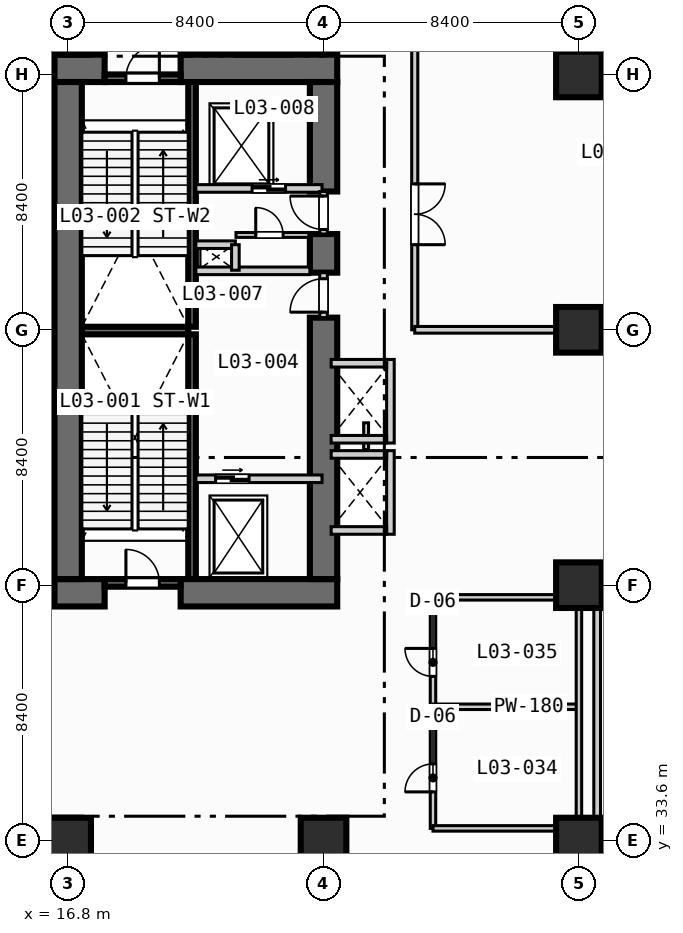
"""IFC4 building model, lengths in metres.
Left out: names, types, materials, properties, quantities, classifications, styles, units other than length and angle.
Written with IfcOpenShell. Run it as: python <this file> out.ifc"""

import sys

from ifc_helpers import new_model, si_unit, direction, frame, frame_2d, origin, origin_2d, place, context, subcontext, project, spatial, rectangle, extrude, element, fill, save


model = new_model("IFC4")
c1 = context("Model", 3, precision=1e-05, world=origin(), true_north=direction((0.0, 1.0)))
c2 = subcontext(c1, "Body", "Model", "MODEL_VIEW")
j1 = project(units=[si_unit("LENGTHUNIT", "METRE"), si_unit("PLANEANGLEUNIT", "RADIAN")], contexts=[c1])
p1 = place(None, origin())
s1 = spatial("IfcSite", under=j1, at=p1, CompositionType="ELEMENT")
p2 = place(p1, origin())
s2 = spatial("IfcBuilding", under=s1, at=p2, CompositionType="ELEMENT")
p3 = place(p2, frame((0.0, 0.0, 15.6)))
s3 = spatial("IfcBuildingStorey", under=s2, at=p3, CompositionType="ELEMENT", Elevation=15.6)
for number, where, z_axis, x_axis in (
    (1, (20.875, 42.2, 0.0), (0.0, 0.0, 1.0), (0.0, 1.0, 0.0)),
    (2, (20.875, 50.5, 0.0), (0.0, 0.0, 1.0), (0.0, 1.0, 0.0)),
):
    element("IfcWall", number, at=place(p3, frame(where, z_axis=z_axis, x_axis=x_axis)), inside=s3, PredefinedType="SOLIDWALL", context=c2, shape_type="SweptSolid", body=[
        extrude(rectangle(XDim=8.05, YDim=0.25, at=frame_2d((4.025, 0.0))), origin(), (0.0, 0.0, 1.0), 4.85),
    ])
p4 = place(p3, frame((17.25, 50.375, 0.0), z_axis=(0.0, 0.0, 1.0), x_axis=(1.0, 0.0, 0.0)))
e3 = element("IfcWall", 3, at=p4, inside=s3, PredefinedType="SOLIDWALL", context=c2, shape_type="SweptSolid", body=[
    extrude(rectangle(XDim=3.5, YDim=0.25, at=frame_2d((1.75, 0.0))), origin(), (0.0, 0.0, 1.0), 4.85),
])
p5 = place(p3, frame((16.35, 41.75, 0.0), z_axis=(0.0, 0.0, 1.0), x_axis=(1.0, 0.0, 0.0)))
e4 = element("IfcWall", 4, at=p5, inside=s3, PredefinedType="SHEAR", context=c2, shape_type="SweptSolid", body=[
    extrude(rectangle(XDim=1.65, YDim=0.9, at=frame_2d((0.825, 0.0))), origin(), (0.0, 0.0, 1.0), 4.85),
])
p6 = place(p3, frame((20.5, 41.75, 0.0), z_axis=(0.0, 0.0, 1.0), x_axis=(1.0, 0.0, 0.0)))
e5 = element("IfcWall", 5, at=p6, inside=s3, PredefinedType="SHEAR", context=c2, shape_type="SweptSolid", body=[
    extrude(rectangle(XDim=5.15, YDim=0.9, at=frame_2d((2.575, 0.0))), origin(), (0.0, 0.0, 1.0), 4.85),
])
p7 = place(p3, frame((16.35, 59.0, 0.0), z_axis=(0.0, 0.0, 1.0), x_axis=(1.0, 0.0, 0.0)))
e6 = element("IfcWall", 6, at=p7, inside=s3, PredefinedType="SHEAR", context=c2, shape_type="SweptSolid", body=[
    extrude(rectangle(XDim=1.65, YDim=0.9, at=frame_2d((0.825, 0.0))), origin(), (0.0, 0.0, 1.0), 4.85),
])
p8 = place(p3, frame((20.5, 59.0, 0.0), z_axis=(0.0, 0.0, 1.0), x_axis=(1.0, 0.0, 0.0)))
e7 = element("IfcWall", 7, at=p8, inside=s3, PredefinedType="SHEAR", context=c2, shape_type="SweptSolid", body=[
    extrude(rectangle(XDim=5.15, YDim=0.9, at=frame_2d((2.575, 0.0))), origin(), (0.0, 0.0, 1.0), 4.85),
])
p9 = place(p3, frame((16.8, 42.2, 0.0), z_axis=(0.0, 0.0, 1.0), x_axis=(0.0, 1.0, 0.0)))
e8 = element("IfcWall", 8, at=p9, inside=s3, PredefinedType="SHEAR", context=c2, shape_type="SweptSolid", body=[
    extrude(rectangle(XDim=16.35, YDim=0.9, at=frame_2d((8.175, 0.0))), origin(), (0.0, 0.0, 1.0), 4.85),
])
p10 = place(p3, frame((25.2, 42.2, 0.0), z_axis=(0.0, 0.0, 1.0), x_axis=(0.0, 1.0, 0.0)))
e9 = element("IfcWall", 9, at=p10, inside=s3, PredefinedType="SHEAR", context=c2, shape_type="SweptSolid", body=[
    extrude(rectangle(XDim=8.6, YDim=0.9, at=frame_2d((4.3, 0.0))), origin(), (0.0, 0.0, 1.0), 4.85),
])
p11 = place(p3, frame((25.2, 52.28, 0.0), z_axis=(0.0, 0.0, 1.0), x_axis=(0.0, 1.0, 0.0)))
e10 = element("IfcWall", 10, at=p11, inside=s3, PredefinedType="SHEAR", context=c2, shape_type="SweptSolid", body=[
    extrude(rectangle(XDim=1.27, YDim=0.9, at=frame_2d((0.635, 0.0))), origin(), (0.0, 0.0, 1.0), 4.85),
])
p12 = place(p3, frame((25.2, 54.95, 0.0), z_axis=(0.0, 0.0, 1.0), x_axis=(0.0, 1.0, 0.0)))
e11 = element("IfcWall", 11, at=p12, inside=s3, PredefinedType="SHEAR", context=c2, shape_type="SweptSolid", body=[
    extrude(rectangle(XDim=3.6, YDim=0.9, at=frame_2d((1.8, 0.0))), origin(), (0.0, 0.0, 1.0), 4.85),
])
for number, where, z_axis, x_axis in (
    (12, (16.8, 33.6, 0.0), (0.0, 0.0, 1.0), (1.0, 0.0, 0.0)),
    (13, (25.2, 33.6, 0.0), (0.0, 0.0, 1.0), (1.0, 0.0, 0.0)),
    (14, (33.6, 33.6, 0.0), (0.0, 0.0, 1.0), (1.0, 0.0, 0.0)),
    (15, (33.6, 42.0, 0.0), (0.0, 0.0, 1.0), (1.0, 0.0, 0.0)),
    (16, (33.6, 50.4, 0.0), (0.0, 0.0, 1.0), (1.0, 0.0, 0.0)),
    (17, (33.6, 58.8, 0.0), (0.0, 0.0, 1.0), (1.0, 0.0, 0.0)),
):
    element("IfcColumn", number, at=place(p3, frame(where, z_axis=z_axis, x_axis=x_axis)), inside=s3, PredefinedType="COLUMN", context=c2, shape_type="SweptSolid", body=[
        extrude(rectangle(XDim=1.5, YDim=1.5, at=origin_2d()), origin(), (0.0, 0.0, 1.0), 5.2),
    ])
p13 = place(p3, frame((18.0, 42.075, 0.0), z_axis=(0.0, 0.0, 1.0), x_axis=(1.0, 0.0, 0.0)))
e18 = element("IfcWall", 18, at=p13, inside=s3, PredefinedType="SOLIDWALL", context=c2, shape_type="SweptSolid", body=[
    extrude(rectangle(XDim=2.5, YDim=0.25, at=frame_2d((1.25, 0.0))), origin(), (0.0, 0.0, 1.0), 4.85),
])
p14 = place(p13, frame((0.7, 0.0, 0.0)))
e19 = element("IfcOpeningElement", 19, at=p14, cuts=e18, PredefinedType="OPENING", context=c2, shape_type="SweptSolid", body=[
    extrude(rectangle(XDim=1.1, YDim=2.15, at=frame_2d((0.55, 1.075))), frame((0.0, 0.135, 0.0), z_axis=(0.0, -1.0, 0.0), x_axis=(1.0, 0.0, 0.0)), (0.0, 0.0, 1.0), 0.27),
])
p15 = place(p3, frame((18.0, 58.675, 0.0), z_axis=(0.0, 0.0, 1.0), x_axis=(1.0, 0.0, 0.0)))
e20 = element("IfcWall", 20, at=p15, inside=s3, PredefinedType="SOLIDWALL", context=c2, shape_type="SweptSolid", body=[
    extrude(rectangle(XDim=2.5, YDim=0.25, at=frame_2d((1.25, 0.0))), origin(), (0.0, 0.0, 1.0), 4.85),
])
p16 = place(p15, frame((0.7, 0.0, 0.0)))
e21 = element("IfcOpeningElement", 21, at=p16, cuts=e20, PredefinedType="OPENING", context=c2, shape_type="SweptSolid", body=[
    extrude(rectangle(XDim=1.1, YDim=2.15, at=frame_2d((0.55, 1.075))), frame((0.0, 0.135, 0.0), z_axis=(0.0, -1.0, 0.0), x_axis=(1.0, 0.0, 0.0)), (0.0, 0.0, 1.0), 0.27),
])
p17 = place(p3, frame((21.0, 45.5, 0.0), z_axis=(0.0, 0.0, 1.0), x_axis=(1.0, 0.0, 0.0)))
e22 = element("IfcWall", 22, at=p17, inside=s3, PredefinedType="SOLIDWALL", context=c2, shape_type="SweptSolid", body=[
    extrude(rectangle(XDim=4.15, YDim=0.25, at=frame_2d((2.075, 0.0))), origin(), (0.0, 0.0, 1.0), 4.85),
])
p18 = place(p17, frame((0.65, 0.0, 0.0)))
e23 = element("IfcOpeningElement", 23, at=p18, cuts=e22, PredefinedType="OPENING", context=c2, shape_type="SweptSolid", body=[
    extrude(rectangle(XDim=1.1, YDim=2.15, at=frame_2d((0.55, 1.075))), frame((0.0, 0.135, 0.0), z_axis=(0.0, -1.0, 0.0), x_axis=(1.0, 0.0, 0.0)), (0.0, 0.0, 1.0), 0.27),
])
p19 = place(p3, frame((25.2, 50.8, 0.0), z_axis=(0.0, 0.0, 1.0), x_axis=(0.0, 1.0, 0.0)))
e24 = element("IfcWall", 24, at=p19, inside=s3, PredefinedType="SOLIDWALL", context=c2, shape_type="SweptSolid", body=[
    extrude(rectangle(XDim=1.48, YDim=0.25, at=frame_2d((0.74, 0.0))), origin(), (0.0, 0.0, 1.0), 4.85),
])
p20 = place(p19, frame((0.18, 0.0, 0.0)))
e25 = element("IfcOpeningElement", 25, at=p20, cuts=e24, PredefinedType="OPENING", context=c2, shape_type="SweptSolid", body=[
    extrude(rectangle(XDim=1.1, YDim=2.15, at=frame_2d((0.55, 1.075))), frame((0.0, 0.135, 0.0), z_axis=(0.0, -1.0, 0.0), x_axis=(1.0, 0.0, 0.0)), (0.0, 0.0, 1.0), 0.27),
])
p21 = place(p3, frame((21.0, 52.34, 0.0), z_axis=(0.0, 0.0, 1.0), x_axis=(1.0, 0.0, 0.0)))
e26 = element("IfcWall", 26, at=p21, inside=s3, PredefinedType="SOLIDWALL", context=c2, shape_type="SweptSolid", body=[
    extrude(rectangle(XDim=3.75, YDim=0.25, at=frame_2d((1.875, 0.0))), origin(), (0.0, 0.0, 1.0), 4.85),
])
p22 = place(p3, frame((21.0, 55.05, 0.0), z_axis=(0.0, 0.0, 1.0), x_axis=(1.0, 0.0, 0.0)))
e27 = element("IfcWall", 27, at=p22, inside=s3, PredefinedType="SOLIDWALL", context=c2, shape_type="SweptSolid", body=[
    extrude(rectangle(XDim=4.15, YDim=0.25, at=frame_2d((2.075, 0.0))), origin(), (0.0, 0.0, 1.0), 4.85),
])
p23 = place(p22, frame((1.85, 0.0, 0.0)))
e28 = element("IfcOpeningElement", 28, at=p23, cuts=e27, PredefinedType="OPENING", context=c2, shape_type="SweptSolid", body=[
    extrude(rectangle(XDim=1.1, YDim=2.15, at=frame_2d((0.55, 1.075))), frame((0.0, 0.135, 0.0), z_axis=(0.0, -1.0, 0.0), x_axis=(1.0, 0.0, 0.0)), (0.0, 0.0, 1.0), 0.27),
])
p24 = place(p3, frame((25.2, 53.55, 0.0), z_axis=(0.0, 0.0, 1.0), x_axis=(0.0, 1.0, 0.0)))
e29 = element("IfcWall", 29, at=p24, inside=s3, PredefinedType="SOLIDWALL", context=c2, shape_type="SweptSolid", body=[
    extrude(rectangle(XDim=1.4, YDim=0.25, at=frame_2d((0.7, 0.0))), origin(), (0.0, 0.0, 1.0), 4.85),
])
p25 = place(p24, frame((0.15, 0.0, 0.0)))
e30 = element("IfcOpeningElement", 30, at=p25, cuts=e29, PredefinedType="OPENING", context=c2, shape_type="SweptSolid", body=[
    extrude(rectangle(XDim=1.1, YDim=2.15, at=frame_2d((0.55, 1.075))), frame((0.0, 0.135, 0.0), z_axis=(0.0, -1.0, 0.0), x_axis=(1.0, 0.0, 0.0)), (0.0, 0.0, 1.0), 0.27),
])
p26 = place(p3, frame((21.0, 53.2, 0.0), z_axis=(0.0, 0.0, 1.0), x_axis=(1.0, 0.0, 0.0)))
e31 = element("IfcWall", 31, at=p26, inside=s3, PredefinedType="SOLIDWALL", context=c2, shape_type="SweptSolid", body=[
    extrude(rectangle(XDim=1.3, YDim=0.25, at=frame_2d((0.65, 0.0))), origin(), (0.0, 0.0, 1.0), 4.85),
])
p27 = place(p3, frame((22.3, 52.36, 0.0), z_axis=(0.0, 0.0, 1.0), x_axis=(0.0, 1.0, 0.0)))
e32 = element("IfcWall", 32, at=p27, inside=s3, PredefinedType="SOLIDWALL", context=c2, shape_type="SweptSolid", body=[
    extrude(rectangle(XDim=0.84, YDim=0.25, at=frame_2d((0.42, 0.0))), origin(), (0.0, 0.0, 1.0), 4.85),
])
p28 = place(p3, frame((22.32, 53.52, 0.0), z_axis=(0.0, 0.0, 1.0), x_axis=(1.0, 0.0, 0.0)))
e33 = element("IfcWall", 33, at=p28, inside=s3, PredefinedType="PARTITIONING", context=c2, shape_type="SweptSolid", body=[
    extrude(rectangle(XDim=2.4, YDim=0.16, at=frame_2d((1.2, 0.0))), origin(), (0.0, 0.0, 1.0), 4.85),
])
p29 = place(p28, frame((0.65, 0.0, 0.0)))
e34 = element("IfcOpeningElement", 34, at=p29, cuts=e33, PredefinedType="OPENING", context=c2, shape_type="SweptSolid", body=[
    extrude(rectangle(XDim=0.9, YDim=2.1, at=frame_2d((0.45, 1.05))), frame((0.0, 0.09, 0.0), z_axis=(0.0, -1.0, 0.0), x_axis=(1.0, 0.0, 0.0)), (0.0, 0.0, 1.0), 0.18),
])
p30 = place(p3, frame((27.4, 43.675, 0.0), z_axis=(0.0, 0.0, 1.0), x_axis=(0.0, 1.0, 0.0)))
e35 = element("IfcWall", 35, at=p30, inside=s3, PredefinedType="SOLIDWALL", context=c2, shape_type="SweptSolid", body=[
    extrude(rectangle(XDim=2.75, YDim=0.25, at=frame_2d((1.375, 0.0))), origin(), (0.0, 0.0, 1.0), 4.85),
])
for number, where, z_axis, x_axis in (
    (36, (25.45, 43.8, 0.0), (0.0, 0.0, 1.0), (1.0, 0.0, 0.0)),
    (37, (25.45, 46.3, 0.0), (0.0, 0.0, 1.0), (1.0, 0.0, 0.0)),
):
    element("IfcWall", number, at=place(p3, frame(where, z_axis=z_axis, x_axis=x_axis)), inside=s3, PredefinedType="SOLIDWALL", context=c2, shape_type="SweptSolid", body=[
        extrude(rectangle(XDim=1.825, YDim=0.25, at=frame_2d((0.913, 0.0))), origin(), (0.0, 0.0, 1.0), 4.85),
    ])
p31 = place(p3, frame((26.6, 46.46, 0.0), z_axis=(0.0, 0.0, 1.0), x_axis=(0.0, 1.0, 0.0)))
e38 = element("IfcWall", 38, at=p31, inside=s3, PredefinedType="PARTITIONING", context=c2, shape_type="SweptSolid", body=[
    extrude(rectangle(XDim=0.88, YDim=0.16, at=frame_2d((0.44, 0.0))), origin(), (0.0, 0.0, 1.0), 4.85),
])
p32 = place(p3, frame((27.4, 46.675, 0.0), z_axis=(0.0, 0.0, 1.0), x_axis=(0.0, 1.0, 0.0)))
e39 = element("IfcWall", 39, at=p32, inside=s3, PredefinedType="SOLIDWALL", context=c2, shape_type="SweptSolid", body=[
    extrude(rectangle(XDim=2.75, YDim=0.25, at=frame_2d((1.375, 0.0))), origin(), (0.0, 0.0, 1.0), 4.85),
])
for number, where, z_axis, x_axis in (
    (40, (25.45, 46.8, 0.0), (0.0, 0.0, 1.0), (1.0, 0.0, 0.0)),
    (41, (25.45, 49.3, 0.0), (0.0, 0.0, 1.0), (1.0, 0.0, 0.0)),
):
    element("IfcWall", number, at=place(p3, frame(where, z_axis=z_axis, x_axis=x_axis)), inside=s3, PredefinedType="SOLIDWALL", context=c2, shape_type="SweptSolid", body=[
        extrude(rectangle(XDim=1.825, YDim=0.25, at=frame_2d((0.913, 0.0))), origin(), (0.0, 0.0, 1.0), 4.85),
    ])
p33 = place(p3, frame((28.8, 34.0, 0.0), z_axis=(0.0, 0.0, 1.0), x_axis=(0.0, 1.0, 0.0)))
e42 = element("IfcWall", 42, at=p33, inside=s3, PredefinedType="PLUMBINGWALL", context=c2, shape_type="SweptSolid", body=[
    extrude(rectangle(XDim=7.6, YDim=0.18, at=frame_2d((3.8, 0.0))), origin(), (0.0, 0.0, 1.0), 4.85),
])
p34 = place(p33, frame((1.2, 0.0, 0.0)))
e43 = element("IfcOpeningElement", 43, at=p34, cuts=e42, PredefinedType="OPENING", context=c2, shape_type="SweptSolid", body=[
    extrude(rectangle(XDim=0.92, YDim=2.1, at=frame_2d((0.46, 1.05))), frame((0.0, 0.1, 0.0), z_axis=(0.0, -1.0, 0.0), x_axis=(1.0, 0.0, 0.0)), (0.0, 0.0, 1.0), 0.2),
])
p35 = place(p33, frame((5.0, 0.0, 0.0)))
e44 = element("IfcOpeningElement", 44, at=p35, cuts=e42, PredefinedType="OPENING", context=c2, shape_type="SweptSolid", body=[
    extrude(rectangle(XDim=0.92, YDim=2.1, at=frame_2d((0.46, 1.05))), frame((0.0, 0.1, 0.0), z_axis=(0.0, -1.0, 0.0), x_axis=(1.0, 0.0, 0.0)), (0.0, 0.0, 1.0), 0.2),
])
p36 = place(p3, frame((28.8, 38.0, 0.0), z_axis=(0.0, 0.0, 1.0), x_axis=(1.0, 0.0, 0.0)))
e45 = element("IfcWall", 45, at=p36, inside=s3, PredefinedType="PLUMBINGWALL", context=c2, shape_type="SweptSolid", body=[
    extrude(rectangle(XDim=4.8, YDim=0.18, at=frame_2d((2.4, 0.0))), origin(), (0.0, 0.0, 1.0), 4.85),
])
p37 = place(p3, frame((33.6, 34.0, 0.0), z_axis=(0.0, 0.0, 1.0), x_axis=(0.0, 1.0, 0.0)))
e46 = element("IfcWall", 46, at=p37, inside=s3, PredefinedType="PLUMBINGWALL", context=c2, shape_type="SweptSolid", body=[
    extrude(rectangle(XDim=7.6, YDim=0.18, at=frame_2d((3.8, 0.0))), origin(), (0.0, 0.0, 1.0), 4.0),
])
p38 = place(p3, frame((28.8, 34.0, 0.0), z_axis=(0.0, 0.0, 1.0), x_axis=(1.0, 0.0, 0.0)))
e47 = element("IfcWall", 47, at=p38, inside=s3, PredefinedType="PLUMBINGWALL", context=c2, shape_type="SweptSolid", body=[
    extrude(rectangle(XDim=4.8, YDim=0.18, at=frame_2d((2.4, 0.0))), origin(), (0.0, 0.0, 1.0), 4.0),
])
p39 = place(p3, frame((28.8, 41.6, 0.0), z_axis=(0.0, 0.0, 1.0), x_axis=(1.0, 0.0, 0.0)))
e48 = element("IfcWall", 48, at=p39, inside=s3, PredefinedType="PLUMBINGWALL", context=c2, shape_type="SweptSolid", body=[
    extrude(rectangle(XDim=4.8, YDim=0.18, at=frame_2d((2.4, 0.0))), origin(), (0.0, 0.0, 1.0), 4.85),
])
p40 = place(p3, frame((34.2, 28.2, 0.0), z_axis=(0.0, 0.0, 1.0), x_axis=(0.0, 1.0, 0.0)))
e49 = element("IfcWall", 49, at=p40, inside=s3, PredefinedType="PARTITIONING", context=c2, shape_type="SweptSolid", body=[
    extrude(rectangle(XDim=13.4, YDim=0.22, at=frame_2d((6.7, 0.0))), origin(), (0.0, 0.0, 1.0), 4.85),
])
p41 = place(p3, frame((28.2, 50.4, 0.0), z_axis=(0.0, 0.0, 1.0), x_axis=(0.0, 1.0, 0.0)))
e50 = element("IfcWall", 50, at=p41, inside=s3, PredefinedType="PARTITIONING", context=c2, shape_type="SweptSolid", body=[
    extrude(rectangle(XDim=38.6, YDim=0.2, at=frame_2d((19.3, 0.0))), origin(), (0.0, 0.0, 1.0), 4.85),
])
p42 = place(p41, frame((2.8, 0.0, 0.0)))
e51 = element("IfcOpeningElement", 51, at=p42, cuts=e50, PredefinedType="OPENING", context=c2, shape_type="SweptSolid", body=[
    extrude(rectangle(XDim=2.0, YDim=2.15, at=frame_2d((1.0, 1.075))), frame((0.0, 0.11, 0.0), z_axis=(0.0, -1.0, 0.0), x_axis=(1.0, 0.0, 0.0)), (0.0, 0.0, 1.0), 0.22),
])
p43 = place(p41, frame((14.4, 0.0, 0.0)))
e52 = element("IfcOpeningElement", 52, at=p43, cuts=e50, PredefinedType="OPENING", context=c2, shape_type="SweptSolid", body=[
    extrude(rectangle(XDim=2.0, YDim=2.15, at=frame_2d((1.0, 1.075))), frame((0.0, 0.11, 0.0), z_axis=(0.0, -1.0, 0.0), x_axis=(1.0, 0.0, 0.0)), (0.0, 0.0, 1.0), 0.22),
])
p44 = place(p41, frame((28.0, 0.0, 0.0)))
e53 = element("IfcOpeningElement", 53, at=p44, cuts=e50, PredefinedType="OPENING", context=c2, shape_type="SweptSolid", body=[
    extrude(rectangle(XDim=2.0, YDim=2.15, at=frame_2d((1.0, 1.075))), frame((0.0, 0.11, 0.0), z_axis=(0.0, -1.0, 0.0), x_axis=(1.0, 0.0, 0.0)), (0.0, 0.0, 1.0), 0.22),
])
p45 = place(p3, frame((28.2, 50.4, 0.0), z_axis=(0.0, 0.0, 1.0), x_axis=(1.0, 0.0, 0.0)))
e54 = element("IfcWall", 54, at=p45, inside=s3, PredefinedType="PARTITIONING", context=c2, shape_type="SweptSolid", body=[
    extrude(rectangle(XDim=13.4, YDim=0.22, at=frame_2d((6.7, 0.0))), origin(), (0.0, 0.0, 1.0), 4.0),
])
p46 = place(p14, origin())
e55 = element("IfcDoor", 55, at=p46, inside=s3, OperationType="SINGLE_SWING_LEFT", PredefinedType="DOOR", context=c2, shape_type="SweptSolid", body=[
    extrude(rectangle(XDim=1.1, YDim=2.15, at=frame_2d((0.55, 1.075))), frame((0.0, 0.025, 0.0), z_axis=(0.0, -1.0, 0.0), x_axis=(1.0, 0.0, 0.0)), (0.0, 0.0, 1.0), 0.05),
])
fill(e19, e55)
p47 = place(p16, origin())
e56 = element("IfcDoor", 56, at=p47, inside=s3, OperationType="SINGLE_SWING_RIGHT", PredefinedType="DOOR", context=c2, shape_type="SweptSolid", body=[
    extrude(rectangle(XDim=1.1, YDim=2.15, at=frame_2d((0.55, 1.075))), frame((0.0, 0.025, 0.0), z_axis=(0.0, -1.0, 0.0), x_axis=(1.0, 0.0, 0.0)), (0.0, 0.0, 1.0), 0.05),
])
fill(e21, e56)
p48 = place(p18, origin())
e57 = element("IfcDoor", 57, at=p48, inside=s3, OperationType="SLIDING_TO_LEFT", PredefinedType="DOOR", context=c2, shape_type="SweptSolid", body=[
    extrude(rectangle(XDim=1.1, YDim=2.15, at=frame_2d((0.55, 1.075))), frame((0.0, 0.025, 0.0), z_axis=(0.0, -1.0, 0.0), x_axis=(1.0, 0.0, 0.0)), (0.0, 0.0, 1.0), 0.05),
])
fill(e23, e57)
p49 = place(p20, origin())
e58 = element("IfcDoor", 58, at=p49, inside=s3, OperationType="SINGLE_SWING_LEFT", PredefinedType="DOOR", context=c2, shape_type="SweptSolid", body=[
    extrude(rectangle(XDim=1.1, YDim=2.15, at=frame_2d((0.55, 1.075))), frame((0.0, 0.025, 0.0), z_axis=(0.0, -1.0, 0.0), x_axis=(1.0, 0.0, 0.0)), (0.0, 0.0, 1.0), 0.05),
])
fill(e25, e58)
p50 = place(p23, origin())
e59 = element("IfcDoor", 59, at=p50, inside=s3, OperationType="SLIDING_TO_LEFT", PredefinedType="DOOR", context=c2, shape_type="SweptSolid", body=[
    extrude(rectangle(XDim=1.1, YDim=2.15, at=frame_2d((0.55, 1.075))), frame((0.0, 0.025, 0.0), z_axis=(0.0, -1.0, 0.0), x_axis=(1.0, 0.0, 0.0)), (0.0, 0.0, 1.0), 0.05),
])
fill(e28, e59)
p51 = place(p25, origin())
e60 = element("IfcDoor", 60, at=p51, inside=s3, OperationType="SINGLE_SWING_RIGHT", PredefinedType="DOOR", context=c2, shape_type="SweptSolid", body=[
    extrude(rectangle(XDim=1.1, YDim=2.15, at=frame_2d((0.55, 1.075))), frame((0.0, 0.025, 0.0), z_axis=(0.0, -1.0, 0.0), x_axis=(1.0, 0.0, 0.0)), (0.0, 0.0, 1.0), 0.05),
])
fill(e30, e60)
p52 = place(p29, origin())
e61 = element("IfcDoor", 61, at=p52, inside=s3, OperationType="SINGLE_SWING_LEFT", PredefinedType="DOOR", context=c2, shape_type="SweptSolid", body=[
    extrude(rectangle(XDim=0.9, YDim=2.1, at=frame_2d((0.45, 1.05))), frame((0.0, 0.025, 0.0), z_axis=(0.0, -1.0, 0.0), x_axis=(1.0, 0.0, 0.0)), (0.0, 0.0, 1.0), 0.05),
])
fill(e34, e61)
p53 = place(p34, origin())
e62 = element("IfcDoor", 62, at=p53, inside=s3, OperationType="SINGLE_SWING_LEFT", PredefinedType="DOOR", context=c2, shape_type="SweptSolid", body=[
    extrude(rectangle(XDim=0.92, YDim=2.1, at=frame_2d((0.46, 1.05))), frame((0.0, 0.025, 0.0), z_axis=(0.0, -1.0, 0.0), x_axis=(1.0, 0.0, 0.0)), (0.0, 0.0, 1.0), 0.05),
])
fill(e43, e62)
p54 = place(p35, origin())
e63 = element("IfcDoor", 63, at=p54, inside=s3, OperationType="SINGLE_SWING_RIGHT", PredefinedType="DOOR", context=c2, shape_type="SweptSolid", body=[
    extrude(rectangle(XDim=0.92, YDim=2.1, at=frame_2d((0.46, 1.05))), frame((0.0, 0.025, 0.0), z_axis=(0.0, -1.0, 0.0), x_axis=(1.0, 0.0, 0.0)), (0.0, 0.0, 1.0), 0.05),
])
fill(e44, e63)
p55 = place(p42, origin())
e64 = element("IfcDoor", 64, at=p55, inside=s3, OperationType="SINGLE_SWING_RIGHT", PredefinedType="DOOR", context=c2, shape_type="SweptSolid", body=[
    extrude(rectangle(XDim=2.0, YDim=2.15, at=frame_2d((1.0, 1.075))), frame((0.0, 0.025, 0.0), z_axis=(0.0, -1.0, 0.0), x_axis=(1.0, 0.0, 0.0)), (0.0, 0.0, 1.0), 0.05),
])
fill(e51, e64)
save(model, sys.argv[1])
